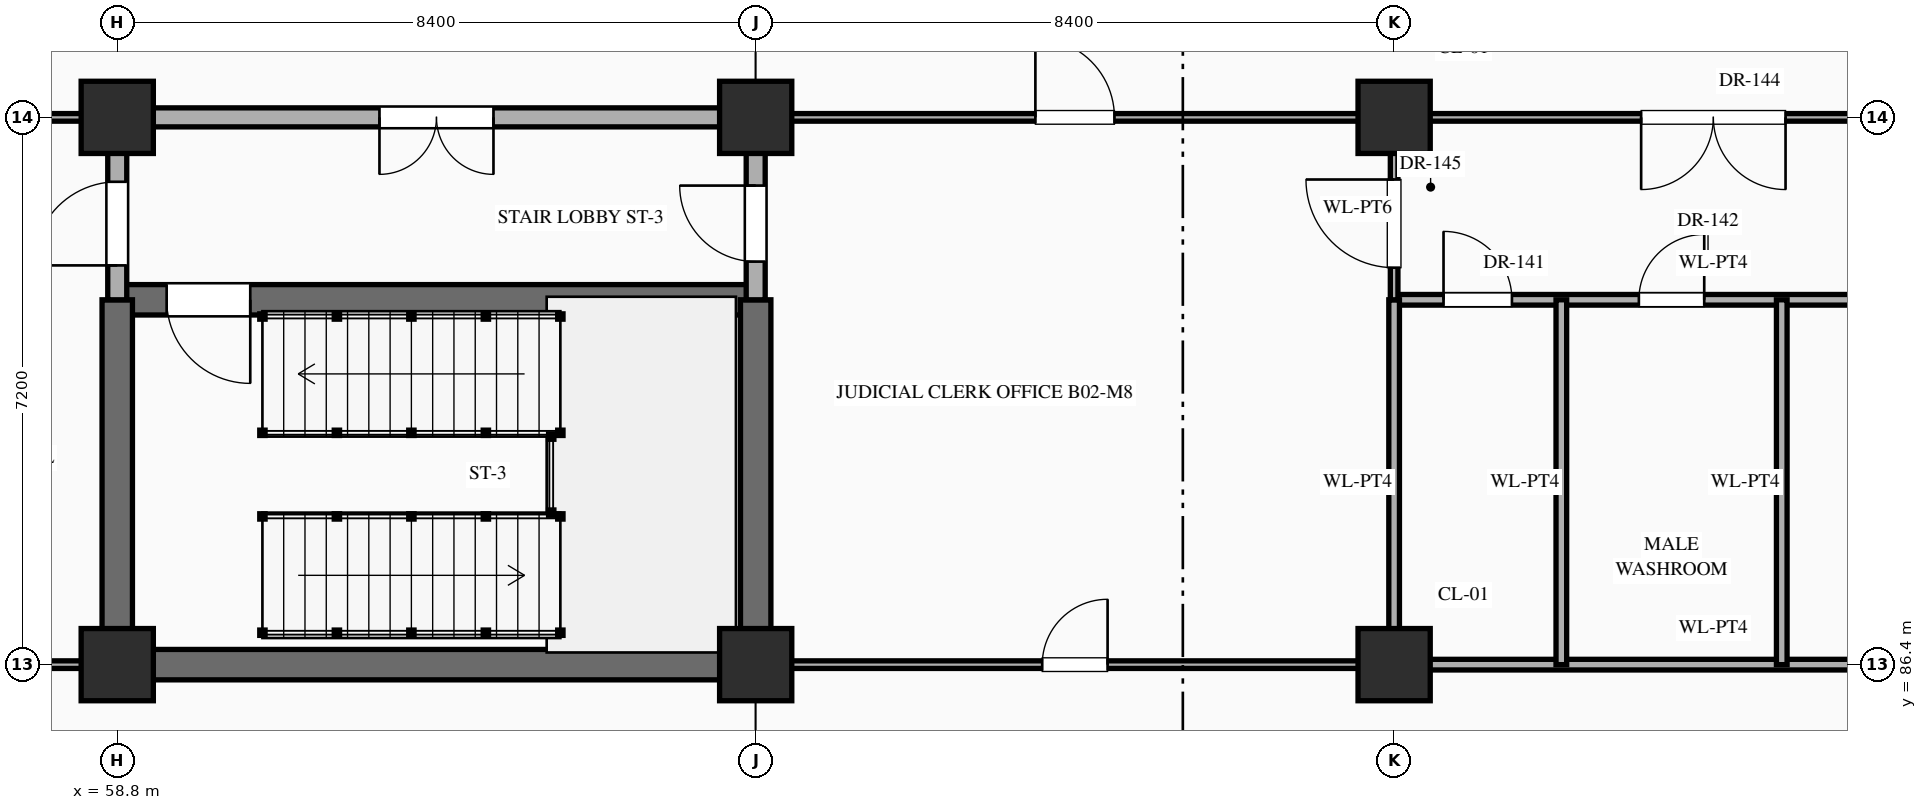
"""IFC4 building model, lengths in metres.
Left out: names, types, materials, properties, quantities, classifications, styles, units other than length and angle.
Written with IfcOpenShell. Run it as: python <this file> out.ifc"""

import sys

from ifc_helpers import new_model, si_unit, direction, frame, frame_2d, origin, origin_2d, place, context, subcontext, project, spatial, rectangle, extrude, element, fill, save


model = new_model("IFC4")
c1 = context("Model", 3, precision=1e-05, world=origin(), true_north=direction((0.0, 1.0)))
c2 = subcontext(c1, "Body", "Model", "MODEL_VIEW")
j1 = project(units=[si_unit("LENGTHUNIT", "METRE"), si_unit("PLANEANGLEUNIT", "RADIAN")], contexts=[c1])
p1 = place(None, origin())
s1 = spatial("IfcSite", under=j1, at=p1, CompositionType="ELEMENT")
p2 = place(p1, origin())
s2 = spatial("IfcBuilding", under=s1, at=p2, CompositionType="ELEMENT")
p3 = place(p2, frame((0.0, 0.0, -10.2)))
s3 = spatial("IfcBuildingStorey", under=s2, at=p3, CompositionType="ELEMENT", Elevation=-10.2)
for number, where, z_axis, x_axis in (
    (1, (58.8, 86.4, 0.0), (0.0, 0.0, 1.0), (1.0, 0.0, 0.0)),
    (2, (58.8, 93.6, 0.0), (0.0, 0.0, 1.0), (1.0, 0.0, 0.0)),
    (3, (67.2, 86.4, 0.0), (0.0, 0.0, 1.0), (1.0, 0.0, 0.0)),
    (4, (67.2, 93.6, 0.0), (0.0, 0.0, 1.0), (1.0, 0.0, 0.0)),
    (5, (75.6, 86.4, 0.0), (0.0, 0.0, 1.0), (1.0, 0.0, 0.0)),
    (6, (75.6, 93.6, 0.0), (0.0, 0.0, 1.0), (1.0, 0.0, 0.0)),
):
    element("IfcColumn", number, at=place(p3, frame(where, z_axis=z_axis, x_axis=x_axis)), inside=s3, PredefinedType="COLUMN", context=c2, shape_type="SweptSolid", body=[
        extrude(rectangle(XDim=0.95, YDim=0.95, at=origin_2d()), origin(), (0.0, 0.0, 1.0), 4.8),
    ])
p4 = place(p3, frame((50.4, 86.4, 0.0), z_axis=(0.0, 0.0, 1.0), x_axis=(1.0, 0.0, 0.0)))
e7 = element("IfcWall", 7, at=p4, inside=s3, PredefinedType="STANDARD", context=c2, shape_type="SweptSolid", body=[
    extrude(rectangle(XDim=8.4, YDim=0.1, at=frame_2d((4.2, 0.0))), origin(), (0.0, 0.0, 1.0), 3.63),
])
p5 = place(p4, frame((1.087, 0.0, 0.0)))
e8 = element("IfcOpeningElement", 8, at=p5, cuts=e7, PredefinedType="OPENING", context=c2, shape_type="SweptSolid", body=[
    extrude(rectangle(XDim=1.02, YDim=2.4, at=frame_2d((0.51, 1.2))), frame((0.0, 0.062, 0.0), z_axis=(0.0, -1.0, 0.0), x_axis=(1.0, 0.0, 0.0)), (0.0, 0.0, 1.0), 0.124),
])
p6 = place(p4, frame((3.63, 0.0, 0.0)))
e9 = element("IfcOpeningElement", 9, at=p6, cuts=e7, PredefinedType="OPENING", context=c2, shape_type="SweptSolid", body=[
    extrude(rectangle(XDim=1.14, YDim=2.4, at=frame_2d((0.57, 1.2))), frame((0.0, 0.062, 0.0), z_axis=(0.0, -1.0, 0.0), x_axis=(1.0, 0.0, 0.0)), (0.0, 0.0, 1.0), 0.124),
])
p7 = place(p4, frame((6.353, 0.0, 0.0)))
e10 = element("IfcOpeningElement", 10, at=p7, cuts=e7, PredefinedType="OPENING", context=c2, shape_type="SweptSolid", body=[
    extrude(rectangle(XDim=0.9, YDim=2.15, at=frame_2d((0.45, 1.075))), frame((0.0, 0.062, 0.0), z_axis=(0.0, -1.0, 0.0), x_axis=(1.0, 0.0, 0.0)), (0.0, 0.0, 1.0), 0.124),
])
p8 = place(p3, frame((58.8, 86.4, 0.0), z_axis=(0.0, 0.0, 1.0), x_axis=(1.0, 0.0, 0.0)))
e11 = element("IfcWall", 11, at=p8, inside=s3, PredefinedType="SHEAR", context=c2, shape_type="SweptSolid", body=[
    extrude(rectangle(XDim=8.4, YDim=0.4, at=frame_2d((4.2, 0.0))), origin(), (0.0, 0.0, 1.0), 4.48),
])
p9 = place(p3, frame((67.2, 86.4, 0.0), z_axis=(0.0, 0.0, 1.0), x_axis=(1.0, 0.0, 0.0)))
e12 = element("IfcWall", 12, at=p9, inside=s3, PredefinedType="STANDARD", context=c2, shape_type="SweptSolid", body=[
    extrude(rectangle(XDim=8.4, YDim=0.1, at=frame_2d((4.2, 0.0))), origin(), (0.0, 0.0, 1.0), 3.63),
])
p10 = place(p9, frame((3.77, 0.0, 0.0)))
e13 = element("IfcOpeningElement", 13, at=p10, cuts=e12, PredefinedType="OPENING", context=c2, shape_type="SweptSolid", body=[
    extrude(rectangle(XDim=0.86, YDim=2.1, at=frame_2d((0.43, 1.05))), frame((0.0, 0.062, 0.0), z_axis=(0.0, -1.0, 0.0), x_axis=(1.0, 0.0, 0.0)), (0.0, 0.0, 1.0), 0.124),
])
p11 = place(p3, frame((75.6, 86.4, 0.0), z_axis=(0.0, 0.0, 1.0), x_axis=(1.0, 0.0, 0.0)))
e14 = element("IfcWall", 14, at=p11, inside=s3, PredefinedType="STANDARD", context=c2, shape_type="SweptSolid", body=[
    extrude(rectangle(XDim=8.4, YDim=0.14, at=frame_2d((4.2, 0.0))), origin(), (0.0, 0.0, 1.0), 3.63),
])
p12 = place(p3, frame((58.8, 91.2, 0.0), z_axis=(0.0, 0.0, 1.0), x_axis=(1.0, 0.0, 0.0)))
e15 = element("IfcWall", 15, at=p12, inside=s3, PredefinedType="SHEAR", context=c2, shape_type="SweptSolid", body=[
    extrude(rectangle(XDim=8.4, YDim=0.4, at=frame_2d((4.2, 0.0))), origin(), (0.0, 0.0, 1.0), 4.48),
])
p13 = place(p12, frame((0.65, 0.0, 0.0)))
e16 = element("IfcOpeningElement", 16, at=p13, cuts=e15, PredefinedType="OPENING", context=c2, shape_type="SweptSolid", body=[
    extrude(rectangle(XDim=1.1, YDim=2.2, at=frame_2d((0.55, 1.1))), frame((0.0, 0.212, 0.0), z_axis=(0.0, -1.0, 0.0), x_axis=(1.0, 0.0, 0.0)), (0.0, 0.0, 1.0), 0.424),
])
p14 = place(p3, frame((75.6, 91.2, 0.0), z_axis=(0.0, 0.0, 1.0), x_axis=(1.0, 0.0, 0.0)))
e17 = element("IfcWall", 17, at=p14, inside=s3, PredefinedType="STANDARD", context=c2, shape_type="SweptSolid", body=[
    extrude(rectangle(XDim=8.4, YDim=0.14, at=frame_2d((4.2, 0.0))), origin(), (0.0, 0.0, 1.0), 4.48),
])
p15 = place(p14, frame((0.65, 0.0, 0.0)))
e18 = element("IfcOpeningElement", 18, at=p15, cuts=e17, PredefinedType="OPENING", context=c2, shape_type="SweptSolid", body=[
    extrude(rectangle(XDim=0.9, YDim=2.15, at=frame_2d((0.45, 1.075))), frame((0.0, 0.082, 0.0), z_axis=(0.0, -1.0, 0.0), x_axis=(1.0, 0.0, 0.0)), (0.0, 0.0, 1.0), 0.164),
])
p16 = place(p14, frame((3.22, 0.0, 0.0)))
e19 = element("IfcOpeningElement", 19, at=p16, cuts=e17, PredefinedType="OPENING", context=c2, shape_type="SweptSolid", body=[
    extrude(rectangle(XDim=0.86, YDim=2.1, at=frame_2d((0.43, 1.05))), frame((0.0, 0.082, 0.0), z_axis=(0.0, -1.0, 0.0), x_axis=(1.0, 0.0, 0.0)), (0.0, 0.0, 1.0), 0.164),
])
p17 = place(p14, frame((6.32, 0.0, 0.0)))
e20 = element("IfcOpeningElement", 20, at=p17, cuts=e17, PredefinedType="OPENING", context=c2, shape_type="SweptSolid", body=[
    extrude(rectangle(XDim=0.86, YDim=2.1, at=frame_2d((0.43, 1.05))), frame((0.0, 0.082, 0.0), z_axis=(0.0, -1.0, 0.0), x_axis=(1.0, 0.0, 0.0)), (0.0, 0.0, 1.0), 0.164),
])
p18 = place(p3, frame((50.4, 93.6, 0.0), z_axis=(0.0, 0.0, 1.0), x_axis=(1.0, 0.0, 0.0)))
e21 = element("IfcWall", 21, at=p18, inside=s3, PredefinedType="STANDARD", context=c2, shape_type="SweptSolid", body=[
    extrude(rectangle(XDim=8.4, YDim=0.1, at=frame_2d((4.2, 0.0))), origin(), (0.0, 0.0, 1.0), 3.63),
])
p19 = place(p18, frame((1.137, 0.0, 0.0)))
e22 = element("IfcOpeningElement", 22, at=p19, cuts=e21, PredefinedType="OPENING", context=c2, shape_type="SweptSolid", body=[
    extrude(rectangle(XDim=0.92, YDim=2.15, at=frame_2d((0.46, 1.075))), frame((0.0, 0.062, 0.0), z_axis=(0.0, -1.0, 0.0), x_axis=(1.0, 0.0, 0.0)), (0.0, 0.0, 1.0), 0.124),
])
p20 = place(p18, frame((3.72, 0.0, 0.0)))
e23 = element("IfcOpeningElement", 23, at=p20, cuts=e21, PredefinedType="OPENING", context=c2, shape_type="SweptSolid", body=[
    extrude(rectangle(XDim=0.96, YDim=2.2, at=frame_2d((0.48, 1.1))), frame((0.0, 0.062, 0.0), z_axis=(0.0, -1.0, 0.0), x_axis=(1.0, 0.0, 0.0)), (0.0, 0.0, 1.0), 0.124),
])
p21 = place(p18, frame((6.302, 0.0, 0.0)))
e24 = element("IfcOpeningElement", 24, at=p21, cuts=e21, PredefinedType="OPENING", context=c2, shape_type="SweptSolid", body=[
    extrude(rectangle(XDim=1.0, YDim=2.25, at=frame_2d((0.5, 1.125))), frame((0.0, 0.062, 0.0), z_axis=(0.0, -1.0, 0.0), x_axis=(1.0, 0.0, 0.0)), (0.0, 0.0, 1.0), 0.124),
])
p22 = place(p3, frame((58.8, 93.6, 0.0), z_axis=(0.0, 0.0, 1.0), x_axis=(1.0, 0.0, 0.0)))
e25 = element("IfcWall", 25, at=p22, inside=s3, PredefinedType="STANDARD", context=c2, shape_type="SweptSolid", body=[
    extrude(rectangle(XDim=8.4, YDim=0.25, at=frame_2d((4.2, 0.0))), origin(), (0.0, 0.0, 1.0), 3.63),
])
p23 = place(p22, frame((3.45, 0.0, 0.0)))
e26 = element("IfcOpeningElement", 26, at=p23, cuts=e25, PredefinedType="OPENING", context=c2, shape_type="SweptSolid", body=[
    extrude(rectangle(XDim=1.5, YDim=2.25, at=frame_2d((0.75, 1.125))), frame((0.0, 0.137, 0.0), z_axis=(0.0, -1.0, 0.0), x_axis=(1.0, 0.0, 0.0)), (0.0, 0.0, 1.0), 0.274),
])
p24 = place(p3, frame((67.2, 93.6, 0.0), z_axis=(0.0, 0.0, 1.0), x_axis=(1.0, 0.0, 0.0)))
e27 = element("IfcWall", 27, at=p24, inside=s3, PredefinedType="STANDARD", context=c2, shape_type="SweptSolid", body=[
    extrude(rectangle(XDim=33.6, YDim=0.1, at=frame_2d((16.8, 0.0))), origin(), (0.0, 0.0, 1.0), 3.63),
])
p25 = place(p24, frame((11.65, 0.0, 0.0)))
e28 = element("IfcOpeningElement", 28, at=p25, cuts=e27, PredefinedType="OPENING", context=c2, shape_type="SweptSolid", body=[
    extrude(rectangle(XDim=1.9, YDim=2.5, at=frame_2d((0.95, 1.25))), frame((0.0, 0.062, 0.0), z_axis=(0.0, -1.0, 0.0), x_axis=(1.0, 0.0, 0.0)), (0.0, 0.0, 1.0), 0.124),
])
p26 = place(p24, frame((3.68, 0.0, 0.0)))
e29 = element("IfcOpeningElement", 29, at=p26, cuts=e27, PredefinedType="OPENING", context=c2, shape_type="SweptSolid", body=[
    extrude(rectangle(XDim=1.04, YDim=2.2, at=frame_2d((0.52, 1.1))), frame((0.0, 0.062, 0.0), z_axis=(0.0, -1.0, 0.0), x_axis=(1.0, 0.0, 0.0)), (0.0, 0.0, 1.0), 0.124),
])
p27 = place(p24, frame((17.867, 0.0, 0.0)))
e30 = element("IfcOpeningElement", 30, at=p27, cuts=e27, PredefinedType="OPENING", context=c2, shape_type="SweptSolid", body=[
    extrude(rectangle(XDim=1.06, YDim=2.4, at=frame_2d((0.53, 1.2))), frame((0.0, 0.062, 0.0), z_axis=(0.0, -1.0, 0.0), x_axis=(1.0, 0.0, 0.0)), (0.0, 0.0, 1.0), 0.124),
])
p28 = place(p24, frame((20.43, 0.0, 0.0)))
e31 = element("IfcOpeningElement", 31, at=p28, cuts=e27, PredefinedType="OPENING", context=c2, shape_type="SweptSolid", body=[
    extrude(rectangle(XDim=1.14, YDim=2.4, at=frame_2d((0.57, 1.2))), frame((0.0, 0.062, 0.0), z_axis=(0.0, -1.0, 0.0), x_axis=(1.0, 0.0, 0.0)), (0.0, 0.0, 1.0), 0.124),
])
p29 = place(p24, frame((23.153, 0.0, 0.0)))
e32 = element("IfcOpeningElement", 32, at=p29, cuts=e27, PredefinedType="OPENING", context=c2, shape_type="SweptSolid", body=[
    extrude(rectangle(XDim=0.9, YDim=2.15, at=frame_2d((0.45, 1.075))), frame((0.0, 0.062, 0.0), z_axis=(0.0, -1.0, 0.0), x_axis=(1.0, 0.0, 0.0)), (0.0, 0.0, 1.0), 0.124),
])
p30 = place(p24, frame((28.97, 0.0, 0.0)))
e33 = element("IfcOpeningElement", 33, at=p30, cuts=e27, PredefinedType="OPENING", context=c2, shape_type="SweptSolid", body=[
    extrude(rectangle(XDim=0.86, YDim=2.1, at=frame_2d((0.43, 1.05))), frame((0.0, 0.062, 0.0), z_axis=(0.0, -1.0, 0.0), x_axis=(1.0, 0.0, 0.0)), (0.0, 0.0, 1.0), 0.124),
])
p31 = place(p3, frame((58.8, 86.4, 0.0), z_axis=(0.0, 0.0, 1.0), x_axis=(0.0, 1.0, 0.0)))
e34 = element("IfcWall", 34, at=p31, inside=s3, PredefinedType="SHEAR", context=c2, shape_type="SweptSolid", body=[
    extrude(rectangle(XDim=4.8, YDim=0.4, at=frame_2d((2.4, 0.0))), origin(), (0.0, 0.0, 1.0), 4.48),
])
p32 = place(p3, frame((58.8, 91.2, 0.0), z_axis=(0.0, 0.0, 1.0), x_axis=(0.0, 1.0, 0.0)))
e35 = element("IfcWall", 35, at=p32, inside=s3, PredefinedType="STANDARD", context=c2, shape_type="SweptSolid", body=[
    extrude(rectangle(XDim=2.4, YDim=0.25, at=frame_2d((1.2, 0.0))), origin(), (0.0, 0.0, 1.0), 3.73),
])
p33 = place(p32, frame((0.452, 0.0, 0.0)))
e36 = element("IfcOpeningElement", 36, at=p33, cuts=e35, PredefinedType="OPENING", context=c2, shape_type="SweptSolid", body=[
    extrude(rectangle(XDim=1.1, YDim=2.2, at=frame_2d((0.55, 1.1))), frame((0.0, 0.137, 0.0), z_axis=(0.0, -1.0, 0.0), x_axis=(1.0, 0.0, 0.0)), (0.0, 0.0, 1.0), 0.274),
])
p34 = place(p3, frame((67.2, 86.4, 0.0), z_axis=(0.0, 0.0, 1.0), x_axis=(0.0, 1.0, 0.0)))
e37 = element("IfcWall", 37, at=p34, inside=s3, PredefinedType="SHEAR", context=c2, shape_type="SweptSolid", body=[
    extrude(rectangle(XDim=4.8, YDim=0.4, at=frame_2d((2.4, 0.0))), origin(), (0.0, 0.0, 1.0), 4.48),
])
p35 = place(p3, frame((67.2, 91.2, 0.0), z_axis=(0.0, 0.0, 1.0), x_axis=(0.0, 1.0, 0.0)))
e38 = element("IfcWall", 38, at=p35, inside=s3, PredefinedType="STANDARD", context=c2, shape_type="SweptSolid", body=[
    extrude(rectangle(XDim=2.4, YDim=0.25, at=frame_2d((1.2, 0.0))), origin(), (0.0, 0.0, 1.0), 3.73),
])
p36 = place(p35, frame((0.502, 0.0, 0.0)))
e39 = element("IfcOpeningElement", 39, at=p36, cuts=e38, PredefinedType="OPENING", context=c2, shape_type="SweptSolid", body=[
    extrude(rectangle(XDim=1.0, YDim=2.2, at=frame_2d((0.5, 1.1))), frame((0.0, 0.137, 0.0), z_axis=(0.0, -1.0, 0.0), x_axis=(1.0, 0.0, 0.0)), (0.0, 0.0, 1.0), 0.274),
])
p37 = place(p3, frame((75.6, 86.4, 0.0), z_axis=(0.0, 0.0, 1.0), x_axis=(0.0, 1.0, 0.0)))
e40 = element("IfcWall", 40, at=p37, inside=s3, PredefinedType="STANDARD", context=c2, shape_type="SweptSolid", body=[
    extrude(rectangle(XDim=4.8, YDim=0.14, at=frame_2d((2.4, 0.0))), origin(), (0.0, 0.0, 1.0), 3.73),
])
p38 = place(p3, frame((75.6, 91.2, 0.0), z_axis=(0.0, 0.0, 1.0), x_axis=(0.0, 1.0, 0.0)))
e41 = element("IfcWall", 41, at=p38, inside=s3, PredefinedType="STANDARD", context=c2, shape_type="SweptSolid", body=[
    extrude(rectangle(XDim=2.4, YDim=0.1, at=frame_2d((1.2, 0.0))), origin(), (0.0, 0.0, 1.0), 3.73),
])
p39 = place(p38, frame((0.423, 0.0, 0.0)))
e42 = element("IfcOpeningElement", 42, at=p39, cuts=e41, PredefinedType="OPENING", context=c2, shape_type="SweptSolid", body=[
    extrude(rectangle(XDim=1.16, YDim=2.3, at=frame_2d((0.58, 1.15))), frame((0.0, 0.062, 0.0), z_axis=(0.0, -1.0, 0.0), x_axis=(1.0, 0.0, 0.0)), (0.0, 0.0, 1.0), 0.124),
])
for number, where, z_axis, x_axis in (
    (43, (77.8, 86.4, 0.0), (0.0, 0.0, 1.0), (0.0, 1.0, 0.0)),
    (44, (80.7, 86.4, 0.0), (0.0, 0.0, 1.0), (0.0, 1.0, 0.0)),
):
    element("IfcWall", number, at=place(p3, frame(where, z_axis=z_axis, x_axis=x_axis)), inside=s3, PredefinedType="STANDARD", context=c2, shape_type="SweptSolid", body=[
        extrude(rectangle(XDim=4.8, YDim=0.14, at=frame_2d((2.4, 0.0))), origin(), (0.0, 0.0, 1.0), 4.48),
    ])
p40 = place(p13, frame((1.1, 0.0, 0.0), z_axis=(0.0, 0.0, 1.0), x_axis=(-1.0, 0.0, 0.0)))
e45 = element("IfcDoor", 45, at=p40, inside=s3, OperationType="SINGLE_SWING_LEFT", PredefinedType="DOOR", context=c2, shape_type="SweptSolid", body=[
    extrude(rectangle(XDim=1.1, YDim=2.2, at=frame_2d((0.55, 1.1))), frame((0.0, 0.025, 0.0), z_axis=(0.0, -1.0, 0.0), x_axis=(1.0, 0.0, 0.0)), (0.0, 0.0, 1.0), 0.05),
])
fill(e16, e45)
p41 = place(p23, frame((1.5, 0.0, 0.0), z_axis=(0.0, 0.0, 1.0), x_axis=(-1.0, 0.0, 0.0)))
e46 = element("IfcDoor", 46, at=p41, inside=s3, OperationType="DOUBLE_DOOR_SINGLE_SWING", PredefinedType="DOOR", context=c2, shape_type="SweptSolid", body=[
    extrude(rectangle(XDim=1.5, YDim=2.25, at=frame_2d((0.75, 1.125))), frame((0.0, 0.025, 0.0), z_axis=(0.0, -1.0, 0.0), x_axis=(1.0, 0.0, 0.0)), (0.0, 0.0, 1.0), 0.05),
])
fill(e26, e46)
p42 = place(p33, origin())
e47 = element("IfcDoor", 47, at=p42, inside=s3, OperationType="SINGLE_SWING_LEFT", PredefinedType="DOOR", context=c2, shape_type="SweptSolid", body=[
    extrude(rectangle(XDim=1.1, YDim=2.2, at=frame_2d((0.55, 1.1))), frame((0.0, 0.025, 0.0), z_axis=(0.0, -1.0, 0.0), x_axis=(1.0, 0.0, 0.0)), (0.0, 0.0, 1.0), 0.05),
])
fill(e36, e47)
p43 = place(p36, origin())
e48 = element("IfcDoor", 48, at=p43, inside=s3, OperationType="SINGLE_SWING_RIGHT", PredefinedType="DOOR", context=c2, shape_type="SweptSolid", body=[
    extrude(rectangle(XDim=1.0, YDim=2.2, at=frame_2d((0.5, 1.1))), frame((0.0, 0.025, 0.0), z_axis=(0.0, -1.0, 0.0), x_axis=(1.0, 0.0, 0.0)), (0.0, 0.0, 1.0), 0.05),
])
fill(e39, e48)
p44 = place(p15, origin())
e49 = element("IfcDoor", 49, at=p44, inside=s3, OperationType="SINGLE_SWING_LEFT", PredefinedType="DOOR", context=c2, shape_type="SweptSolid", body=[
    extrude(rectangle(XDim=0.9, YDim=2.15, at=frame_2d((0.45, 1.075))), frame((0.0, 0.025, 0.0), z_axis=(0.0, -1.0, 0.0), x_axis=(1.0, 0.0, 0.0)), (0.0, 0.0, 1.0), 0.05),
])
fill(e18, e49)
p45 = place(p16, origin())
e50 = element("IfcDoor", 50, at=p45, inside=s3, OperationType="SINGLE_SWING_RIGHT", PredefinedType="DOOR", context=c2, shape_type="SweptSolid", body=[
    extrude(rectangle(XDim=0.86, YDim=2.1, at=frame_2d((0.43, 1.05))), frame((0.0, 0.025, 0.0), z_axis=(0.0, -1.0, 0.0), x_axis=(1.0, 0.0, 0.0)), (0.0, 0.0, 1.0), 0.05),
])
fill(e19, e50)
p46 = place(p25, frame((1.9, 0.0, 0.0), z_axis=(0.0, 0.0, 1.0), x_axis=(-1.0, 0.0, 0.0)))
e51 = element("IfcDoor", 51, at=p46, inside=s3, OperationType="DOUBLE_DOOR_SINGLE_SWING", PredefinedType="DOOR", context=c2, shape_type="SweptSolid", body=[
    extrude(rectangle(XDim=1.9, YDim=2.5, at=frame_2d((0.95, 1.25))), frame((0.0, 0.025, 0.0), z_axis=(0.0, -1.0, 0.0), x_axis=(1.0, 0.0, 0.0)), (0.0, 0.0, 1.0), 0.05),
])
fill(e28, e51)
p47 = place(p39, origin())
e52 = element("IfcDoor", 52, at=p47, inside=s3, OperationType="SINGLE_SWING_RIGHT", PredefinedType="DOOR", context=c2, shape_type="SweptSolid", body=[
    extrude(rectangle(XDim=1.16, YDim=2.3, at=frame_2d((0.58, 1.15))), frame((0.0, 0.025, 0.0), z_axis=(0.0, -1.0, 0.0), x_axis=(1.0, 0.0, 0.0)), (0.0, 0.0, 1.0), 0.05),
])
fill(e42, e52)
p48 = place(p26, origin())
e53 = element("IfcDoor", 53, at=p48, inside=s3, OperationType="SINGLE_SWING_LEFT", PredefinedType="DOOR", context=c2, shape_type="SweptSolid", body=[
    extrude(rectangle(XDim=1.04, YDim=2.2, at=frame_2d((0.52, 1.1))), frame((0.0, 0.025, 0.0), z_axis=(0.0, -1.0, 0.0), x_axis=(1.0, 0.0, 0.0)), (0.0, 0.0, 1.0), 0.05),
])
fill(e29, e53)
p49 = place(p10, origin())
e54 = element("IfcDoor", 54, at=p49, inside=s3, OperationType="SINGLE_SWING_RIGHT", PredefinedType="DOOR", context=c2, shape_type="SweptSolid", body=[
    extrude(rectangle(XDim=0.86, YDim=2.1, at=frame_2d((0.43, 1.05))), frame((0.0, 0.025, 0.0), z_axis=(0.0, -1.0, 0.0), x_axis=(1.0, 0.0, 0.0)), (0.0, 0.0, 1.0), 0.05),
])
fill(e13, e54)
save(model, sys.argv[1])
